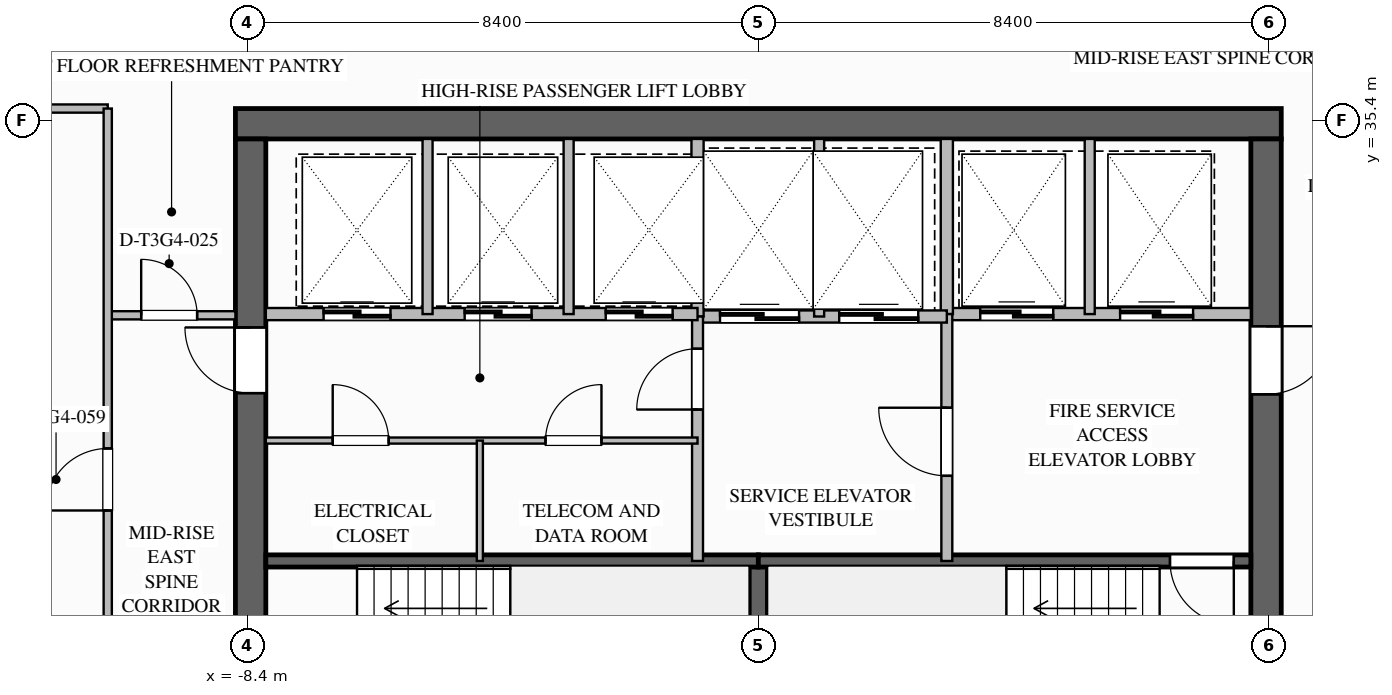
"""IFC4 building model, lengths in metres.
Left out: names, types, materials, properties, quantities, classifications, styles, units other than length and angle.
Written with IfcOpenShell. Run it as: python <this file> out.ifc"""

import sys

from ifc_helpers import new_model, si_unit, direction, frame, frame_2d, origin, place, context, subcontext, project, spatial, rectangle, extrude, element, fill, save


model = new_model("IFC4")
c1 = context("Model", 3, precision=1e-05, world=origin(), true_north=direction((0.0, 1.0)))
c2 = subcontext(c1, "Body", "Model", "MODEL_VIEW")
j1 = project(units=[si_unit("LENGTHUNIT", "METRE"), si_unit("PLANEANGLEUNIT", "RADIAN")], contexts=[c1])
p1 = place(None, origin())
s1 = spatial("IfcSite", under=j1, at=p1, CompositionType="ELEMENT")
p2 = place(p1, origin())
s2 = spatial("IfcBuilding", under=s1, at=p2, CompositionType="ELEMENT")
p3 = place(p2, frame((0.0, 0.0, 182.35)))
s3 = spatial("IfcBuildingStorey", under=s2, at=p3, CompositionType="ELEMENT", Elevation=182.35)
p4 = place(p3, frame((-8.6, 35.35, 0.0), z_axis=(0.0, 0.0, 1.0), x_axis=(1.0, 0.0, 0.0)))
e1 = element("IfcWall", 1, at=p4, inside=s3, PredefinedType="SHEAR", context=c2, shape_type="SweptSolid", body=[
    extrude(rectangle(XDim=17.2, YDim=0.5, at=frame_2d((8.6, 0.0))), origin(), (0.0, 0.0, 1.0), 3.55),
])
p5 = place(p3, frame((8.35, 35.1, 0.0), z_axis=(0.0, 0.0, 1.0), x_axis=(0.0, -1.0, 0.0)))
e2 = element("IfcWall", 2, at=p5, inside=s3, PredefinedType="SHEAR", context=c2, shape_type="SweptSolid", body=[
    extrude(rectangle(XDim=16.2, YDim=0.5, at=frame_2d((8.1, 0.0))), origin(), (0.0, 0.0, 1.0), 3.55),
])
p6 = place(p5, frame((3.08, 0.0, 0.0)))
e3 = element("IfcOpeningElement", 3, at=p6, cuts=e2, PredefinedType="OPENING", context=c2, shape_type="SweptSolid", body=[
    extrude(rectangle(XDim=1.12, YDim=2.1, at=frame_2d((0.56, 1.05))), frame((0.0, 0.26, 0.0), z_axis=(0.0, -1.0, 0.0), x_axis=(1.0, 0.0, 0.0)), (0.0, 0.0, 1.0), 0.52),
])
p7 = place(p5, frame((10.62, 0.0, 0.0)))
e4 = element("IfcOpeningElement", 4, at=p7, cuts=e2, PredefinedType="OPENING", context=c2, shape_type="SweptSolid", body=[
    extrude(rectangle(XDim=1.08, YDim=2.04, at=frame_2d((0.54, 1.02))), frame((0.0, 0.26, 0.0), z_axis=(0.0, -1.0, 0.0), x_axis=(1.0, 0.0, 0.0)), (0.0, 0.0, 1.0), 0.52),
])
p8 = place(p3, frame((-8.35, 18.9, 0.0), z_axis=(0.0, 0.0, 1.0), x_axis=(0.0, 1.0, 0.0)))
e5 = element("IfcWall", 5, at=p8, inside=s3, PredefinedType="SHEAR", context=c2, shape_type="SweptSolid", body=[
    extrude(rectangle(XDim=16.2, YDim=0.5, at=frame_2d((8.1, 0.0))), origin(), (0.0, 0.0, 1.0), 3.55),
])
p9 = place(p8, frame((12.02, 0.0, 0.0)))
e6 = element("IfcOpeningElement", 6, at=p9, cuts=e5, PredefinedType="OPENING", context=c2, shape_type="SweptSolid", body=[
    extrude(rectangle(XDim=1.08, YDim=2.04, at=frame_2d((0.54, 1.02))), frame((0.0, 0.26, 0.0), z_axis=(0.0, -1.0, 0.0), x_axis=(1.0, 0.0, 0.0)), (0.0, 0.0, 1.0), 0.52),
])
p10 = place(p8, frame((4.5, 0.0, 0.0)))
e7 = element("IfcOpeningElement", 7, at=p10, cuts=e5, PredefinedType="OPENING", context=c2, shape_type="SweptSolid", body=[
    extrude(rectangle(XDim=1.08, YDim=2.04, at=frame_2d((0.54, 1.02))), frame((0.0, 0.26, 0.0), z_axis=(0.0, -1.0, 0.0), x_axis=(1.0, 0.0, 0.0)), (0.0, 0.0, 1.0), 0.52),
])
p11 = place(p3, frame((0.0, 25.04, 0.0), z_axis=(0.0, 0.0, 1.0), x_axis=(0.0, 1.0, 0.0)))
e8 = element("IfcWall", 8, at=p11, inside=s3, PredefinedType="SOLIDWALL", context=c2, shape_type="SweptSolid", body=[
    extrude(rectangle(XDim=3.12, YDim=0.3, at=frame_2d((1.56, 0.0))), origin(), (0.0, 0.0, 1.0), 3.29),
])
p12 = place(p3, frame((-8.1, 28.16, 0.0), z_axis=(0.0, 0.0, 1.0), x_axis=(1.0, 0.0, 0.0)))
e9 = element("IfcWall", 9, at=p12, inside=s3, PredefinedType="SOLIDWALL", context=c2, shape_type="SweptSolid", body=[
    extrude(rectangle(XDim=8.1, YDim=0.2, at=frame_2d((4.05, 0.0))), origin(), (0.0, 0.0, 1.0), 3.29),
])
p13 = place(p3, frame((8.1, 28.16, 0.0), z_axis=(0.0, 0.0, 1.0), x_axis=(-1.0, 0.0, 0.0)))
e10 = element("IfcWall", 10, at=p13, inside=s3, PredefinedType="SOLIDWALL", context=c2, shape_type="SweptSolid", body=[
    extrude(rectangle(XDim=8.1, YDim=0.2, at=frame_2d((4.05, 0.0))), origin(), (0.0, 0.0, 1.0), 3.29),
])
p14 = place(p13, frame((0.28, 0.0, 0.0)))
e11 = element("IfcOpeningElement", 11, at=p14, cuts=e10, PredefinedType="OPENING", context=c2, shape_type="SweptSolid", body=[
    extrude(rectangle(XDim=1.05, YDim=2.1, at=frame_2d((0.525, 1.05))), frame((0.0, 0.11, 0.0), z_axis=(0.0, -1.0, 0.0), x_axis=(1.0, 0.0, 0.0)), (0.0, 0.0, 1.0), 0.22),
])
p15 = place(p3, frame((3.1, 32.22, 0.0), z_axis=(0.0, 0.0, 1.0), x_axis=(1.0, 0.0, 0.0)))
e12 = element("IfcWall", 12, at=p15, inside=s3, PredefinedType="SOLIDWALL", context=c2, shape_type="SweptSolid", body=[
    extrude(rectangle(XDim=5.0, YDim=0.2, at=frame_2d((2.5, 0.0))), origin(), (0.0, 0.0, 1.0), 3.29),
])
p16 = place(p15, frame((0.55, 0.0, 0.0)))
e13 = element("IfcOpeningElement", 13, at=p16, cuts=e12, PredefinedType="OPENING", context=c2, shape_type="SweptSolid", body=[
    extrude(rectangle(XDim=1.2, YDim=2.2, at=frame_2d((0.6, 1.1))), frame((0.0, 0.11, 0.0), z_axis=(0.0, -1.0, 0.0), x_axis=(1.0, 0.0, 0.0)), (0.0, 0.0, 1.0), 0.22),
])
p17 = place(p15, frame((2.85, 0.0, 0.0)))
e14 = element("IfcOpeningElement", 14, at=p17, cuts=e12, PredefinedType="OPENING", context=c2, shape_type="SweptSolid", body=[
    extrude(rectangle(XDim=1.2, YDim=2.2, at=frame_2d((0.6, 1.1))), frame((0.0, 0.11, 0.0), z_axis=(0.0, -1.0, 0.0), x_axis=(1.0, 0.0, 0.0)), (0.0, 0.0, 1.0), 0.22),
])
p18 = place(p3, frame((3.1, 32.22, 0.0), z_axis=(0.0, 0.0, 1.0), x_axis=(0.0, 1.0, 0.0)))
e15 = element("IfcWall", 15, at=p18, inside=s3, PredefinedType="SOLIDWALL", context=c2, shape_type="SweptSolid", body=[
    extrude(rectangle(XDim=2.88, YDim=0.2, at=frame_2d((1.44, 0.0))), origin(), (0.0, 0.0, 1.0), 3.29),
])
p19 = place(p3, frame((5.45, 32.22, 0.0), z_axis=(0.0, 0.0, 1.0), x_axis=(0.0, 1.0, 0.0)))
e16 = element("IfcWall", 16, at=p19, inside=s3, PredefinedType="PARTITIONING", context=c2, shape_type="SweptSolid", body=[
    extrude(rectangle(XDim=2.88, YDim=0.165, at=frame_2d((1.44, 0.0))), origin(), (0.0, 0.0, 1.0), 3.29),
])
p20 = place(p3, frame((3.1, 28.16, 0.0), z_axis=(0.0, 0.0, 1.0), x_axis=(0.0, 1.0, 0.0)))
e17 = element("IfcWall", 17, at=p20, inside=s3, PredefinedType="SOLIDWALL", context=c2, shape_type="SweptSolid", body=[
    extrude(rectangle(XDim=4.06, YDim=0.18, at=frame_2d((2.03, 0.0))), origin(), (0.0, 0.0, 1.0), 3.29),
])
p21 = place(p20, frame((1.4, 0.0, 0.0)))
e18 = element("IfcOpeningElement", 18, at=p21, cuts=e17, PredefinedType="OPENING", context=c2, shape_type="SweptSolid", body=[
    extrude(rectangle(XDim=1.12, YDim=2.1, at=frame_2d((0.56, 1.05))), frame((0.0, 0.1, 0.0), z_axis=(0.0, -1.0, 0.0), x_axis=(1.0, 0.0, 0.0)), (0.0, 0.0, 1.0), 0.2),
])
p22 = place(p3, frame((-1.0, 32.18, 0.0), z_axis=(0.0, 0.0, 1.0), x_axis=(1.0, 0.0, 0.0)))
e19 = element("IfcWall", 19, at=p22, inside=s3, PredefinedType="SOLIDWALL", context=c2, shape_type="SweptSolid", body=[
    extrude(rectangle(XDim=4.1, YDim=0.2, at=frame_2d((2.05, 0.0))), origin(), (0.0, 0.0, 1.0), 3.29),
])
p23 = place(p22, frame((0.37, 0.0, 0.0)))
e20 = element("IfcOpeningElement", 20, at=p23, cuts=e19, PredefinedType="OPENING", context=c2, shape_type="SweptSolid", body=[
    extrude(rectangle(XDim=1.3, YDim=2.2, at=frame_2d((0.65, 1.1))), frame((0.0, 0.11, 0.0), z_axis=(0.0, -1.0, 0.0), x_axis=(1.0, 0.0, 0.0)), (0.0, 0.0, 1.0), 0.22),
])
p24 = place(p22, frame((2.33, 0.0, 0.0)))
e21 = element("IfcOpeningElement", 21, at=p24, cuts=e19, PredefinedType="OPENING", context=c2, shape_type="SweptSolid", body=[
    extrude(rectangle(XDim=1.3, YDim=2.2, at=frame_2d((0.65, 1.1))), frame((0.0, 0.11, 0.0), z_axis=(0.0, -1.0, 0.0), x_axis=(1.0, 0.0, 0.0)), (0.0, 0.0, 1.0), 0.22),
])
p25 = place(p3, frame((-1.0, 32.18, 0.0), z_axis=(0.0, 0.0, 1.0), x_axis=(0.0, 1.0, 0.0)))
e22 = element("IfcWall", 22, at=p25, inside=s3, PredefinedType="SOLIDWALL", context=c2, shape_type="SweptSolid", body=[
    extrude(rectangle(XDim=2.92, YDim=0.2, at=frame_2d((1.46, 0.0))), origin(), (0.0, 0.0, 1.0), 3.29),
])
p26 = place(p3, frame((1.0, 32.18, 0.0), z_axis=(0.0, 0.0, 1.0), x_axis=(0.0, 1.0, 0.0)))
e23 = element("IfcWall", 23, at=p26, inside=s3, PredefinedType="PARTITIONING", context=c2, shape_type="SweptSolid", body=[
    extrude(rectangle(XDim=2.92, YDim=0.165, at=frame_2d((1.46, 0.0))), origin(), (0.0, 0.0, 1.0), 3.29),
])
p27 = place(p3, frame((-1.0, 28.16, 0.0), z_axis=(0.0, 0.0, 1.0), x_axis=(0.0, 1.0, 0.0)))
e24 = element("IfcWall", 24, at=p27, inside=s3, PredefinedType="SOLIDWALL", context=c2, shape_type="SweptSolid", body=[
    extrude(rectangle(XDim=4.02, YDim=0.18, at=frame_2d((2.01, 0.0))), origin(), (0.0, 0.0, 1.0), 3.29),
])
p28 = place(p27, frame((2.49, 0.0, 0.0)))
e25 = element("IfcOpeningElement", 25, at=p28, cuts=e24, PredefinedType="OPENING", context=c2, shape_type="SweptSolid", body=[
    extrude(rectangle(XDim=1.0, YDim=2.1, at=frame_2d((0.5, 1.05))), frame((0.0, 0.1, 0.0), z_axis=(0.0, -1.0, 0.0), x_axis=(1.0, 0.0, 0.0)), (0.0, 0.0, 1.0), 0.2),
])
p29 = place(p3, frame((-8.1, 32.22, 0.0), z_axis=(0.0, 0.0, 1.0), x_axis=(1.0, 0.0, 0.0)))
e26 = element("IfcWall", 26, at=p29, inside=s3, PredefinedType="SOLIDWALL", context=c2, shape_type="SweptSolid", body=[
    extrude(rectangle(XDim=7.1, YDim=0.2, at=frame_2d((3.55, 0.0))), origin(), (0.0, 0.0, 1.0), 3.29),
])
p30 = place(p29, frame((0.95, 0.0, 0.0)))
e27 = element("IfcOpeningElement", 27, at=p30, cuts=e26, PredefinedType="OPENING", context=c2, shape_type="SweptSolid", body=[
    extrude(rectangle(XDim=1.1, YDim=2.2, at=frame_2d((0.55, 1.1))), frame((0.0, 0.11, 0.0), z_axis=(0.0, -1.0, 0.0), x_axis=(1.0, 0.0, 0.0)), (0.0, 0.0, 1.0), 0.22),
])
p31 = place(p29, frame((3.27, 0.0, 0.0)))
e28 = element("IfcOpeningElement", 28, at=p31, cuts=e26, PredefinedType="OPENING", context=c2, shape_type="SweptSolid", body=[
    extrude(rectangle(XDim=1.1, YDim=2.2, at=frame_2d((0.55, 1.1))), frame((0.0, 0.11, 0.0), z_axis=(0.0, -1.0, 0.0), x_axis=(1.0, 0.0, 0.0)), (0.0, 0.0, 1.0), 0.22),
])
p32 = place(p29, frame((5.59, 0.0, 0.0)))
e29 = element("IfcOpeningElement", 29, at=p32, cuts=e26, PredefinedType="OPENING", context=c2, shape_type="SweptSolid", body=[
    extrude(rectangle(XDim=1.1, YDim=2.2, at=frame_2d((0.55, 1.1))), frame((0.0, 0.11, 0.0), z_axis=(0.0, -1.0, 0.0), x_axis=(1.0, 0.0, 0.0)), (0.0, 0.0, 1.0), 0.22),
])
for number, where, z_axis, x_axis in (
    (30, (-5.44, 32.22, 0.0), (0.0, 0.0, 1.0), (0.0, 1.0, 0.0)),
    (31, (-3.12, 32.22, 0.0), (0.0, 0.0, 1.0), (0.0, 1.0, 0.0)),
):
    element("IfcWall", number, at=place(p3, frame(where, z_axis=z_axis, x_axis=x_axis)), inside=s3, PredefinedType="PARTITIONING", context=c2, shape_type="SweptSolid", body=[
        extrude(rectangle(XDim=2.88, YDim=0.165, at=frame_2d((1.44, 0.0))), origin(), (0.0, 0.0, 1.0), 3.29),
    ])
p33 = place(p3, frame((-8.1, 30.14, 0.0), z_axis=(0.0, 0.0, 1.0), x_axis=(1.0, 0.0, 0.0)))
e32 = element("IfcWall", 32, at=p33, inside=s3, PredefinedType="PARTITIONING", context=c2, shape_type="SweptSolid", body=[
    extrude(rectangle(XDim=7.1, YDim=0.1, at=frame_2d((3.55, 0.0))), origin(), (0.0, 0.0, 1.0), 3.29),
])
p34 = place(p33, frame((1.1, 0.0, 0.0)))
e33 = element("IfcOpeningElement", 33, at=p34, cuts=e32, PredefinedType="OPENING", context=c2, shape_type="SweptSolid", body=[
    extrude(rectangle(XDim=0.92, YDim=2.1, at=frame_2d((0.46, 1.05))), frame((0.0, 0.06, 0.0), z_axis=(0.0, -1.0, 0.0), x_axis=(1.0, 0.0, 0.0)), (0.0, 0.0, 1.0), 0.12),
])
p35 = place(p33, frame((4.6, 0.0, 0.0)))
e34 = element("IfcOpeningElement", 34, at=p35, cuts=e32, PredefinedType="OPENING", context=c2, shape_type="SweptSolid", body=[
    extrude(rectangle(XDim=0.92, YDim=2.1, at=frame_2d((0.46, 1.05))), frame((0.0, 0.06, 0.0), z_axis=(0.0, -1.0, 0.0), x_axis=(1.0, 0.0, 0.0)), (0.0, 0.0, 1.0), 0.12),
])
p36 = place(p3, frame((-4.58, 28.16, 0.0), z_axis=(0.0, 0.0, 1.0), x_axis=(0.0, 1.0, 0.0)))
e35 = element("IfcWall", 35, at=p36, inside=s3, PredefinedType="PARTITIONING", context=c2, shape_type="SweptSolid", body=[
    extrude(rectangle(XDim=1.98, YDim=0.1, at=frame_2d((0.99, 0.0))), origin(), (0.0, 0.0, 1.0), 3.29),
])
p37 = place(p3, frame((-10.7, 32.2, 0.0), z_axis=(0.0, 0.0, 1.0), x_axis=(1.0, 0.0, 0.0)))
e36 = element("IfcWall", 36, at=p37, inside=s3, PredefinedType="PARTITIONING", context=c2, shape_type="SweptSolid", body=[
    extrude(rectangle(XDim=2.1, YDim=0.135, at=frame_2d((1.05, 0.0))), origin(), (0.0, 0.0, 1.0), 3.29),
])
p38 = place(p37, frame((0.55, 0.0, 0.0)))
e37 = element("IfcOpeningElement", 37, at=p38, cuts=e36, PredefinedType="OPENING", context=c2, shape_type="SweptSolid", body=[
    extrude(rectangle(XDim=0.92, YDim=2.1, at=frame_2d((0.46, 1.05))), frame((0.0, 0.077, 0.0), z_axis=(0.0, -1.0, 0.0), x_axis=(1.0, 0.0, 0.0)), (0.0, 0.0, 1.0), 0.155),
])
p39 = place(p3, frame((-16.2, 35.6, 0.0), z_axis=(0.0, 0.0, 1.0), x_axis=(1.0, 0.0, 0.0)))
e38 = element("IfcWall", 38, at=p39, inside=s3, PredefinedType="PARTITIONING", context=c2, shape_type="SweptSolid", body=[
    extrude(rectangle(XDim=5.5, YDim=0.135, at=frame_2d((2.75, 0.0))), origin(), (0.0, 0.0, 1.0), 2.667),
])
p40 = place(p3, frame((-10.7, 18.4, 0.0), z_axis=(0.0, 0.0, 1.0), x_axis=(0.0, 1.0, 0.0)))
e39 = element("IfcWall", 39, at=p40, inside=s3, PredefinedType="PARTITIONING", context=c2, shape_type="SweptSolid", body=[
    extrude(rectangle(XDim=17.2, YDim=0.135, at=frame_2d((8.6, 0.0))), origin(), (0.0, 0.0, 1.0), 3.29),
])
p41 = place(p40, frame((6.685, 0.0, 0.0)))
e40 = element("IfcOpeningElement", 40, at=p41, cuts=e39, PredefinedType="OPENING", context=c2, shape_type="SweptSolid", body=[
    extrude(rectangle(XDim=1.26, YDim=2.2, at=frame_2d((0.63, 1.1))), frame((0.0, 0.077, 0.0), z_axis=(0.0, -1.0, 0.0), x_axis=(1.0, 0.0, 0.0)), (0.0, 0.0, 1.0), 0.155),
])
p42 = place(p40, frame((10.59, 0.0, 0.0)))
e41 = element("IfcOpeningElement", 41, at=p42, cuts=e39, PredefinedType="OPENING", context=c2, shape_type="SweptSolid", body=[
    extrude(rectangle(XDim=1.02, YDim=2.15, at=frame_2d((0.51, 1.075))), frame((0.0, 0.077, 0.0), z_axis=(0.0, -1.0, 0.0), x_axis=(1.0, 0.0, 0.0)), (0.0, 0.0, 1.0), 0.155),
])
p43 = place(p14, origin())
e42 = element("IfcDoor", 42, at=p43, inside=s3, OperationType="SINGLE_SWING_LEFT", PredefinedType="DOOR", context=c2, shape_type="SweptSolid", body=[
    extrude(rectangle(XDim=1.05, YDim=2.1, at=frame_2d((0.525, 1.05))), frame((0.0, 0.025, 0.0), z_axis=(0.0, -1.0, 0.0), x_axis=(1.0, 0.0, 0.0)), (0.0, 0.0, 1.0), 0.05),
])
fill(e11, e42)
p44 = place(p16, origin())
e43 = element("IfcDoor", 43, at=p44, inside=s3, OperationType="SLIDING_TO_LEFT", PredefinedType="DOOR", context=c2, shape_type="SweptSolid", body=[
    extrude(rectangle(XDim=1.2, YDim=2.2, at=frame_2d((0.6, 1.1))), frame((0.0, 0.025, 0.0), z_axis=(0.0, -1.0, 0.0), x_axis=(1.0, 0.0, 0.0)), (0.0, 0.0, 1.0), 0.05),
])
fill(e13, e43)
p45 = place(p17, origin())
e44 = element("IfcDoor", 44, at=p45, inside=s3, OperationType="SLIDING_TO_LEFT", PredefinedType="DOOR", context=c2, shape_type="SweptSolid", body=[
    extrude(rectangle(XDim=1.2, YDim=2.2, at=frame_2d((0.6, 1.1))), frame((0.0, 0.025, 0.0), z_axis=(0.0, -1.0, 0.0), x_axis=(1.0, 0.0, 0.0)), (0.0, 0.0, 1.0), 0.05),
])
fill(e14, e44)
p46 = place(p21, origin())
e45 = element("IfcDoor", 45, at=p46, inside=s3, OperationType="SINGLE_SWING_RIGHT", PredefinedType="DOOR", context=c2, shape_type="SweptSolid", body=[
    extrude(rectangle(XDim=1.12, YDim=2.1, at=frame_2d((0.56, 1.05))), frame((0.0, 0.025, 0.0), z_axis=(0.0, -1.0, 0.0), x_axis=(1.0, 0.0, 0.0)), (0.0, 0.0, 1.0), 0.05),
])
fill(e18, e45)
p47 = place(p6, origin())
e46 = element("IfcDoor", 46, at=p47, inside=s3, OperationType="SINGLE_SWING_LEFT", PredefinedType="DOOR", context=c2, shape_type="SweptSolid", body=[
    extrude(rectangle(XDim=1.12, YDim=2.1, at=frame_2d((0.56, 1.05))), frame((0.0, 0.025, 0.0), z_axis=(0.0, -1.0, 0.0), x_axis=(1.0, 0.0, 0.0)), (0.0, 0.0, 1.0), 0.05),
])
fill(e3, e46)
p48 = place(p23, origin())
e47 = element("IfcDoor", 47, at=p48, inside=s3, OperationType="SLIDING_TO_LEFT", PredefinedType="DOOR", context=c2, shape_type="SweptSolid", body=[
    extrude(rectangle(XDim=1.3, YDim=2.2, at=frame_2d((0.65, 1.1))), frame((0.0, 0.025, 0.0), z_axis=(0.0, -1.0, 0.0), x_axis=(1.0, 0.0, 0.0)), (0.0, 0.0, 1.0), 0.05),
])
fill(e20, e47)
p49 = place(p24, origin())
e48 = element("IfcDoor", 48, at=p49, inside=s3, OperationType="SLIDING_TO_LEFT", PredefinedType="DOOR", context=c2, shape_type="SweptSolid", body=[
    extrude(rectangle(XDim=1.3, YDim=2.2, at=frame_2d((0.65, 1.1))), frame((0.0, 0.025, 0.0), z_axis=(0.0, -1.0, 0.0), x_axis=(1.0, 0.0, 0.0)), (0.0, 0.0, 1.0), 0.05),
])
fill(e21, e48)
p50 = place(p28, origin())
e49 = element("IfcDoor", 49, at=p50, inside=s3, OperationType="SINGLE_SWING_LEFT", PredefinedType="DOOR", context=c2, shape_type="SweptSolid", body=[
    extrude(rectangle(XDim=1.0, YDim=2.1, at=frame_2d((0.5, 1.05))), frame((0.0, 0.025, 0.0), z_axis=(0.0, -1.0, 0.0), x_axis=(1.0, 0.0, 0.0)), (0.0, 0.0, 1.0), 0.05),
])
fill(e25, e49)
p51 = place(p30, origin())
e50 = element("IfcDoor", 50, at=p51, inside=s3, OperationType="SLIDING_TO_LEFT", PredefinedType="DOOR", context=c2, shape_type="SweptSolid", body=[
    extrude(rectangle(XDim=1.1, YDim=2.2, at=frame_2d((0.55, 1.1))), frame((0.0, 0.025, 0.0), z_axis=(0.0, -1.0, 0.0), x_axis=(1.0, 0.0, 0.0)), (0.0, 0.0, 1.0), 0.05),
])
fill(e27, e50)
p52 = place(p31, origin())
e51 = element("IfcDoor", 51, at=p52, inside=s3, OperationType="SLIDING_TO_LEFT", PredefinedType="DOOR", context=c2, shape_type="SweptSolid", body=[
    extrude(rectangle(XDim=1.1, YDim=2.2, at=frame_2d((0.55, 1.1))), frame((0.0, 0.025, 0.0), z_axis=(0.0, -1.0, 0.0), x_axis=(1.0, 0.0, 0.0)), (0.0, 0.0, 1.0), 0.05),
])
fill(e28, e51)
p53 = place(p32, origin())
e52 = element("IfcDoor", 52, at=p53, inside=s3, OperationType="SLIDING_TO_LEFT", PredefinedType="DOOR", context=c2, shape_type="SweptSolid", body=[
    extrude(rectangle(XDim=1.1, YDim=2.2, at=frame_2d((0.55, 1.1))), frame((0.0, 0.025, 0.0), z_axis=(0.0, -1.0, 0.0), x_axis=(1.0, 0.0, 0.0)), (0.0, 0.0, 1.0), 0.05),
])
fill(e29, e52)
p54 = place(p9, origin())
e53 = element("IfcDoor", 53, at=p54, inside=s3, OperationType="SINGLE_SWING_RIGHT", PredefinedType="DOOR", context=c2, shape_type="SweptSolid", body=[
    extrude(rectangle(XDim=1.08, YDim=2.04, at=frame_2d((0.54, 1.02))), frame((0.0, 0.025, 0.0), z_axis=(0.0, -1.0, 0.0), x_axis=(1.0, 0.0, 0.0)), (0.0, 0.0, 1.0), 0.05),
])
fill(e6, e53)
p55 = place(p34, origin())
e54 = element("IfcDoor", 54, at=p55, inside=s3, OperationType="SINGLE_SWING_LEFT", PredefinedType="DOOR", context=c2, shape_type="SweptSolid", body=[
    extrude(rectangle(XDim=0.92, YDim=2.1, at=frame_2d((0.46, 1.05))), frame((0.0, 0.025, 0.0), z_axis=(0.0, -1.0, 0.0), x_axis=(1.0, 0.0, 0.0)), (0.0, 0.0, 1.0), 0.05),
])
fill(e33, e54)
p56 = place(p35, origin())
e55 = element("IfcDoor", 55, at=p56, inside=s3, OperationType="SINGLE_SWING_RIGHT", PredefinedType="DOOR", context=c2, shape_type="SweptSolid", body=[
    extrude(rectangle(XDim=0.92, YDim=2.1, at=frame_2d((0.46, 1.05))), frame((0.0, 0.025, 0.0), z_axis=(0.0, -1.0, 0.0), x_axis=(1.0, 0.0, 0.0)), (0.0, 0.0, 1.0), 0.05),
])
fill(e34, e55)
p57 = place(p38, origin())
e56 = element("IfcDoor", 56, at=p57, inside=s3, OperationType="SINGLE_SWING_LEFT", PredefinedType="DOOR", context=c2, shape_type="SweptSolid", body=[
    extrude(rectangle(XDim=0.92, YDim=2.1, at=frame_2d((0.46, 1.05))), frame((0.0, 0.025, 0.0), z_axis=(0.0, -1.0, 0.0), x_axis=(1.0, 0.0, 0.0)), (0.0, 0.0, 1.0), 0.05),
])
fill(e37, e56)
p58 = place(p42, origin())
e57 = element("IfcDoor", 57, at=p58, inside=s3, OperationType="SINGLE_SWING_LEFT", PredefinedType="DOOR", context=c2, shape_type="SweptSolid", body=[
    extrude(rectangle(XDim=1.02, YDim=2.15, at=frame_2d((0.51, 1.075))), frame((0.0, 0.025, 0.0), z_axis=(0.0, -1.0, 0.0), x_axis=(1.0, 0.0, 0.0)), (0.0, 0.0, 1.0), 0.05),
])
fill(e41, e57)
save(model, sys.argv[1])
